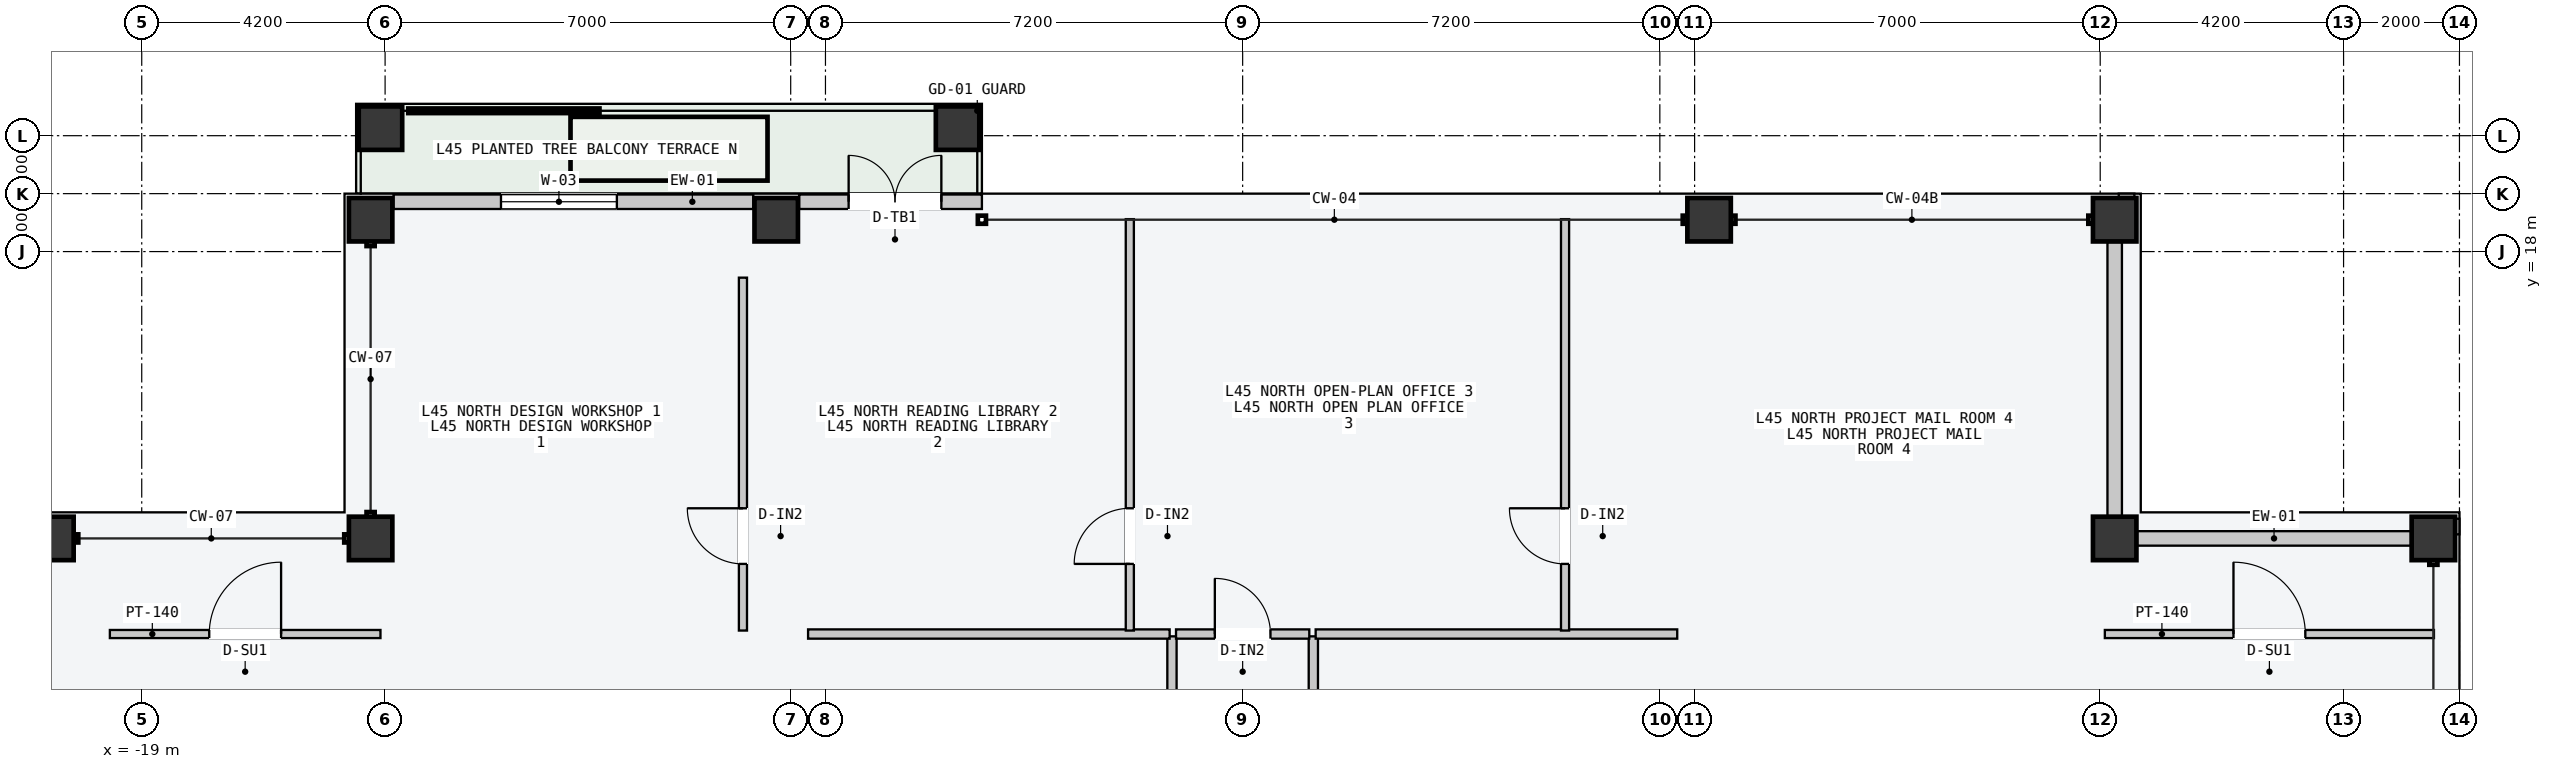
"""IFC4 building model, lengths in metres.
Left out: names, types, materials, properties, quantities, classifications, styles, units other than length and angle.
Written with IfcOpenShell. Run it as: python <this file> out.ifc"""

import sys

from ifc_helpers import new_model, si_unit, direction, frame, frame_2d, origin, origin_2d, place, context, subcontext, project, spatial, rectangle, hollow_rectangle, extrude, element, fill, save


model = new_model("IFC4")
c1 = context("Model", 3, precision=1e-05, world=origin(), true_north=direction((0.0, 1.0)))
c2 = subcontext(c1, "Body", "Model", "MODEL_VIEW")
j1 = project(units=[si_unit("LENGTHUNIT", "METRE"), si_unit("PLANEANGLEUNIT", "RADIAN")], contexts=[c1])
p1 = place(None, origin())
s1 = spatial("IfcSite", under=j1, at=p1, CompositionType="ELEMENT")
p2 = place(p1, origin())
s2 = spatial("IfcBuilding", under=s1, at=p2, CompositionType="ELEMENT")
p3 = place(p2, frame((0.0, 0.0, 173.1)))
s3 = spatial("IfcBuildingStorey", under=s2, at=p3, CompositionType="ELEMENT", Elevation=173.1)
for number, where, z_axis, x_axis in (
    (1, (-15.05, 18.55, 0.0), (0.0, 0.0, 1.0), (1.0, 0.0, 0.0)),
    (2, (-8.05, 18.55, 0.0), (0.0, 0.0, 1.0), (1.0, 0.0, 0.0)),
    (3, (8.05, 18.55, 0.0), (0.0, 0.0, 1.0), (1.0, 0.0, 0.0)),
    (4, (15.05, 18.55, 0.0), (0.0, 0.0, 1.0), (1.0, 0.0, 0.0)),
    (5, (-20.55, 13.05, 0.0), (0.0, 0.0, 1.0), (0.0, 1.0, 0.0)),
    (6, (20.55, 13.05, 0.0), (0.0, 0.0, 1.0), (0.0, 1.0, 0.0)),
    (7, (-15.05, 13.05, 0.0), (0.0, 0.0, 1.0), (1.0, 0.0, 0.0)),
    (8, (15.05, 13.05, 0.0), (0.0, 0.0, 1.0), (1.0, 0.0, 0.0)),
    (9, (-14.88, 20.13, 0.0), (0.0, 0.0, 1.0), (1.0, 0.0, 0.0)),
    (10, (-4.92, 20.13, 0.0), (0.0, 0.0, 1.0), (1.0, 0.0, 0.0)),
):
    element("IfcColumn", number, at=place(p3, frame(where, z_axis=z_axis, x_axis=x_axis)), inside=s3, PredefinedType="COLUMN", context=c2, shape_type="SweptSolid", body=[
        extrude(hollow_rectangle(XDim=0.75, YDim=0.75, WallThickness=0.032, at=origin_2d()), origin(), (0.0, 0.0, 1.0), 3.6),
    ])
p4 = place(p3, frame((-14.655, 18.86, 0.0), z_axis=(0.0, 0.0, 1.0), x_axis=(1.0, 0.0, 0.0)))
e11 = element("IfcWall", 11, at=p4, inside=s3, PredefinedType="STANDARD", context=c2, shape_type="SweptSolid", body=[
    extrude(rectangle(XDim=6.21, YDim=0.25, at=frame_2d((3.105, 0.0))), origin(), (0.0, 0.0, 1.0), 3.4),
])
p5 = place(p4, frame((1.855, 0.0, 0.85)))
e12 = element("IfcOpeningElement", 12, at=p5, cuts=e11, PredefinedType="OPENING", context=c2, shape_type="SweptSolid", body=[
    extrude(rectangle(XDim=2.0, YDim=2.1, at=frame_2d((1.0, 1.05))), frame((0.0, 0.135, 0.0), z_axis=(0.0, -1.0, 0.0), x_axis=(1.0, 0.0, 0.0)), (0.0, 0.0, 1.0), 0.27),
])
p6 = place(p3, frame((-7.655, 18.86, 0.0), z_axis=(0.0, 0.0, 1.0), x_axis=(1.0, 0.0, 0.0)))
e13 = element("IfcWall", 13, at=p6, inside=s3, PredefinedType="STANDARD", context=c2, shape_type="SweptSolid", body=[
    extrude(rectangle(XDim=3.155, YDim=0.25, at=frame_2d((1.578, 0.0))), origin(), (0.0, 0.0, 1.0), 3.4),
])
p7 = place(p6, frame((0.855, 0.0, 0.0)))
e14 = element("IfcOpeningElement", 14, at=p7, cuts=e13, PredefinedType="OPENING", context=c2, shape_type="SweptSolid", body=[
    extrude(rectangle(XDim=1.6, YDim=2.2, at=frame_2d((0.8, 1.1))), frame((0.0, 0.135, 0.0), z_axis=(0.0, -1.0, 0.0), x_axis=(1.0, 0.0, 0.0)), (0.0, 0.0, 1.0), 0.27),
])
for number, where, z_axis, x_axis in (
    (15, (15.435, 13.05, 0.0), (0.0, 0.0, 1.0), (1.0, 0.0, 0.0)),
    (16, (15.05, 13.435, 0.0), (0.0, 0.0, 1.0), (0.0, 1.0, 0.0)),
):
    element("IfcWall", number, at=place(p3, frame(where, z_axis=z_axis, x_axis=x_axis)), inside=s3, PredefinedType="STANDARD", context=c2, shape_type="SweptSolid", body=[
        extrude(rectangle(XDim=4.73, YDim=0.25, at=frame_2d((2.365, 0.0))), origin(), (0.0, 0.0, 1.0), 2.75),
    ])
for number, where, z_axis, x_axis in (
    (17, (15.12, 18.89, 0.0), (0.0, 0.0, 1.0), (1.0, 0.0, 0.0)),
    (18, (20.89, 13.12, 0.0), (0.0, 0.0, 1.0), (0.0, 1.0, 0.0)),
):
    element("IfcWall", number, at=place(p3, frame(where, z_axis=z_axis, x_axis=x_axis)), inside=s3, PredefinedType="PARAPET", context=c2, shape_type="SweptSolid", body=[
        extrude(rectangle(XDim=0.27, YDim=0.22, at=frame_2d((0.135, 0.0))), origin(), (0.0, 0.0, 1.0), 1.2),
    ])
p8 = place(p3, frame((-1.22, -3.5, 0.0), z_axis=(0.0, 0.0, 1.0), x_axis=(0.0, 1.0, 0.0)))
e19 = element("IfcWall", 19, at=p8, inside=s3, PredefinedType="PARTITIONING", context=c2, shape_type="SweptSolid", body=[
    extrude(rectangle(XDim=14.86, YDim=0.16, at=frame_2d((7.43, 0.0))), origin(), (0.0, 0.0, 1.0), 3.4),
])
p9 = place(p8, frame((6.1, 0.0, 0.0)))
e20 = element("IfcOpeningElement", 20, at=p9, cuts=e19, PredefinedType="OPENING", context=c2, shape_type="SweptSolid", body=[
    extrude(rectangle(XDim=1.24, YDim=2.24, at=frame_2d((0.62, 1.12))), frame((0.0, 0.09, 0.0), z_axis=(0.0, -1.0, 0.0), x_axis=(1.0, 0.0, 0.0)), (0.0, 0.0, 1.0), 0.18),
])
p10 = place(p8, frame((1.6, 0.0, 0.0)))
e21 = element("IfcOpeningElement", 21, at=p10, cuts=e19, PredefinedType="OPENING", context=c2, shape_type="SweptSolid", body=[
    extrude(rectangle(XDim=0.96, YDim=2.18, at=frame_2d((0.48, 1.09))), frame((0.0, 0.09, 0.0), z_axis=(0.0, -1.0, 0.0), x_axis=(1.0, 0.0, 0.0)), (0.0, 0.0, 1.0), 0.18),
])
p11 = place(p3, frame((-7.5, 11.4, 0.0), z_axis=(0.0, 0.0, 1.0), x_axis=(1.0, 0.0, 0.0)))
e22 = element("IfcWall", 22, at=p11, inside=s3, PredefinedType="PARTITIONING", context=c2, shape_type="SweptSolid", body=[
    extrude(rectangle(XDim=6.24, YDim=0.16, at=frame_2d((3.12, 0.0))), origin(), (0.0, 0.0, 1.0), 3.4),
])
p12 = place(p3, frame((1.22, -3.5, 0.0), z_axis=(0.0, 0.0, 1.0), x_axis=(0.0, 1.0, 0.0)))
e23 = element("IfcWall", 23, at=p12, inside=s3, PredefinedType="PARTITIONING", context=c2, shape_type="SweptSolid", body=[
    extrude(rectangle(XDim=14.86, YDim=0.16, at=frame_2d((7.43, 0.0))), origin(), (0.0, 0.0, 1.0), 3.4),
])
p13 = place(p12, frame((6.1, 0.0, 0.0)))
e24 = element("IfcOpeningElement", 24, at=p13, cuts=e23, PredefinedType="OPENING", context=c2, shape_type="SweptSolid", body=[
    extrude(rectangle(XDim=1.24, YDim=2.24, at=frame_2d((0.62, 1.12))), frame((0.0, 0.09, 0.0), z_axis=(0.0, -1.0, 0.0), x_axis=(1.0, 0.0, 0.0)), (0.0, 0.0, 1.0), 0.18),
])
p14 = place(p12, frame((1.6, 0.0, 0.0)))
e25 = element("IfcOpeningElement", 25, at=p14, cuts=e23, PredefinedType="OPENING", context=c2, shape_type="SweptSolid", body=[
    extrude(rectangle(XDim=0.96, YDim=2.18, at=frame_2d((0.48, 1.09))), frame((0.0, 0.09, 0.0), z_axis=(0.0, -1.0, 0.0), x_axis=(1.0, 0.0, 0.0)), (0.0, 0.0, 1.0), 0.18),
])
p15 = place(p3, frame((1.26, 11.4, 0.0), z_axis=(0.0, 0.0, 1.0), x_axis=(1.0, 0.0, 0.0)))
e26 = element("IfcWall", 26, at=p15, inside=s3, PredefinedType="PARTITIONING", context=c2, shape_type="SweptSolid", body=[
    extrude(rectangle(XDim=6.24, YDim=0.16, at=frame_2d((3.12, 0.0))), origin(), (0.0, 0.0, 1.0), 3.4),
])
p16 = place(p3, frame((-8.624, 11.46, 0.0), z_axis=(0.0, 0.0, 1.0), x_axis=(0.0, 1.0, 0.0)))
e27 = element("IfcWall", 27, at=p16, inside=s3, PredefinedType="PARTITIONING", context=c2, shape_type="SweptSolid", body=[
    extrude(rectangle(XDim=6.09, YDim=0.14, at=frame_2d((3.045, 0.0))), origin(), (0.0, 0.0, 1.0), 3.4),
])
p17 = place(p16, frame((1.15, 0.0, 0.0)))
e28 = element("IfcOpeningElement", 28, at=p17, cuts=e27, PredefinedType="OPENING", context=c2, shape_type="SweptSolid", body=[
    extrude(rectangle(XDim=0.96, YDim=2.18, at=frame_2d((0.48, 1.09))), frame((0.0, 0.08, 0.0), z_axis=(0.0, -1.0, 0.0), x_axis=(1.0, 0.0, 0.0)), (0.0, 0.0, 1.0), 0.16),
])
p18 = place(p3, frame((-1.948, 11.46, 0.0), z_axis=(0.0, 0.0, 1.0), x_axis=(0.0, 1.0, 0.0)))
e29 = element("IfcWall", 29, at=p18, inside=s3, PredefinedType="PARTITIONING", context=c2, shape_type="SweptSolid", body=[
    extrude(rectangle(XDim=7.1, YDim=0.14, at=frame_2d((3.55, 0.0))), origin(), (0.0, 0.0, 1.0), 3.4),
])
p19 = place(p18, frame((1.15, 0.0, 0.0)))
e30 = element("IfcOpeningElement", 30, at=p19, cuts=e29, PredefinedType="OPENING", context=c2, shape_type="SweptSolid", body=[
    extrude(rectangle(XDim=0.96, YDim=2.18, at=frame_2d((0.48, 1.09))), frame((0.0, 0.08, 0.0), z_axis=(0.0, -1.0, 0.0), x_axis=(1.0, 0.0, 0.0)), (0.0, 0.0, 1.0), 0.16),
])
p20 = place(p3, frame((5.564, 11.46, 0.0), z_axis=(0.0, 0.0, 1.0), x_axis=(0.0, 1.0, 0.0)))
e31 = element("IfcWall", 31, at=p20, inside=s3, PredefinedType="PARTITIONING", context=c2, shape_type="SweptSolid", body=[
    extrude(rectangle(XDim=7.1, YDim=0.14, at=frame_2d((3.55, 0.0))), origin(), (0.0, 0.0, 1.0), 3.4),
])
p21 = place(p20, frame((1.15, 0.0, 0.0)))
e32 = element("IfcOpeningElement", 32, at=p21, cuts=e31, PredefinedType="OPENING", context=c2, shape_type="SweptSolid", body=[
    extrude(rectangle(XDim=0.96, YDim=2.18, at=frame_2d((0.48, 1.09))), frame((0.0, 0.08, 0.0), z_axis=(0.0, -1.0, 0.0), x_axis=(1.0, 0.0, 0.0)), (0.0, 0.0, 1.0), 0.16),
])
p22 = place(p3, frame((-1.15, 11.4, 0.0), z_axis=(0.0, 0.0, 1.0), x_axis=(1.0, 0.0, 0.0)))
e33 = element("IfcWall", 33, at=p22, inside=s3, PredefinedType="PARTITIONING", context=c2, shape_type="SweptSolid", body=[
    extrude(rectangle(XDim=2.3, YDim=0.16, at=frame_2d((1.15, 0.0))), origin(), (0.0, 0.0, 1.0), 3.4),
])
p23 = place(p22, frame((0.67, 0.0, 0.0)))
e34 = element("IfcOpeningElement", 34, at=p23, cuts=e33, PredefinedType="OPENING", context=c2, shape_type="SweptSolid", body=[
    extrude(rectangle(XDim=0.96, YDim=2.18, at=frame_2d((0.48, 1.09))), frame((0.0, 0.09, 0.0), z_axis=(0.0, -1.0, 0.0), x_axis=(1.0, 0.0, 0.0)), (0.0, 0.0, 1.0), 0.18),
])
p24 = place(p3, frame((-19.55, 11.4, 0.0), z_axis=(0.0, 0.0, 1.0), x_axis=(1.0, 0.0, 0.0)))
e35 = element("IfcWall", 35, at=p24, inside=s3, PredefinedType="PARTITIONING", context=c2, shape_type="SweptSolid", body=[
    extrude(rectangle(XDim=4.67, YDim=0.14, at=frame_2d((2.335, 0.0))), origin(), (0.0, 0.0, 1.0), 3.4),
])
p25 = place(p24, frame((1.715, 0.0, 0.0)))
e36 = element("IfcOpeningElement", 36, at=p25, cuts=e35, PredefinedType="OPENING", context=c2, shape_type="SweptSolid", body=[
    extrude(rectangle(XDim=1.24, YDim=2.24, at=frame_2d((0.62, 1.12))), frame((0.0, 0.08, 0.0), z_axis=(0.0, -1.0, 0.0), x_axis=(1.0, 0.0, 0.0)), (0.0, 0.0, 1.0), 0.16),
])
p26 = place(p3, frame((14.88, 11.4, 0.0), z_axis=(0.0, 0.0, 1.0), x_axis=(1.0, 0.0, 0.0)))
e37 = element("IfcWall", 37, at=p26, inside=s3, PredefinedType="PARTITIONING", context=c2, shape_type="SweptSolid", body=[
    extrude(rectangle(XDim=5.68, YDim=0.14, at=frame_2d((2.84, 0.0))), origin(), (0.0, 0.0, 1.0), 3.4),
])
p27 = place(p26, frame((2.22, 0.0, 0.0)))
e38 = element("IfcOpeningElement", 38, at=p27, cuts=e37, PredefinedType="OPENING", context=c2, shape_type="SweptSolid", body=[
    extrude(rectangle(XDim=1.24, YDim=2.24, at=frame_2d((0.62, 1.12))), frame((0.0, 0.08, 0.0), z_axis=(0.0, -1.0, 0.0), x_axis=(1.0, 0.0, 0.0)), (0.0, 0.0, 1.0), 0.16),
])
p28 = place(p5, origin())
e39 = element("IfcWindow", 39, at=p28, inside=s3, PartitioningType="SINGLE_PANEL", PredefinedType="WINDOW", context=c2, shape_type="SweptSolid", body=[
    extrude(rectangle(XDim=2.0, YDim=2.1, at=frame_2d((1.0, 1.05))), frame((0.0, 0.03, 0.0), z_axis=(0.0, -1.0, 0.0), x_axis=(1.0, 0.0, 0.0)), (0.0, 0.0, 1.0), 0.06),
])
fill(e12, e39)
p29 = place(p7, origin())
e40 = element("IfcDoor", 40, at=p29, inside=s3, OperationType="DOUBLE_DOOR_SINGLE_SWING", PredefinedType="DOOR", context=c2, shape_type="SweptSolid", body=[
    extrude(rectangle(XDim=1.6, YDim=2.2, at=frame_2d((0.8, 1.1))), frame((0.0, 0.025, 0.0), z_axis=(0.0, -1.0, 0.0), x_axis=(1.0, 0.0, 0.0)), (0.0, 0.0, 1.0), 0.05),
])
fill(e14, e40)
p30 = place(p17, origin())
e41 = element("IfcDoor", 41, at=p30, inside=s3, OperationType="SINGLE_SWING_RIGHT", PredefinedType="DOOR", context=c2, shape_type="SweptSolid", body=[
    extrude(rectangle(XDim=0.96, YDim=2.18, at=frame_2d((0.48, 1.09))), frame((0.0, 0.025, 0.0), z_axis=(0.0, -1.0, 0.0), x_axis=(1.0, 0.0, 0.0)), (0.0, 0.0, 1.0), 0.05),
])
fill(e28, e41)
p31 = place(p19, origin())
e42 = element("IfcDoor", 42, at=p31, inside=s3, OperationType="SINGLE_SWING_LEFT", PredefinedType="DOOR", context=c2, shape_type="SweptSolid", body=[
    extrude(rectangle(XDim=0.96, YDim=2.18, at=frame_2d((0.48, 1.09))), frame((0.0, 0.025, 0.0), z_axis=(0.0, -1.0, 0.0), x_axis=(1.0, 0.0, 0.0)), (0.0, 0.0, 1.0), 0.05),
])
fill(e30, e42)
p32 = place(p21, origin())
e43 = element("IfcDoor", 43, at=p32, inside=s3, OperationType="SINGLE_SWING_RIGHT", PredefinedType="DOOR", context=c2, shape_type="SweptSolid", body=[
    extrude(rectangle(XDim=0.96, YDim=2.18, at=frame_2d((0.48, 1.09))), frame((0.0, 0.025, 0.0), z_axis=(0.0, -1.0, 0.0), x_axis=(1.0, 0.0, 0.0)), (0.0, 0.0, 1.0), 0.05),
])
fill(e32, e43)
p33 = place(p23, origin())
e44 = element("IfcDoor", 44, at=p33, inside=s3, OperationType="SINGLE_SWING_LEFT", PredefinedType="DOOR", context=c2, shape_type="SweptSolid", body=[
    extrude(rectangle(XDim=0.96, YDim=2.18, at=frame_2d((0.48, 1.09))), frame((0.0, 0.025, 0.0), z_axis=(0.0, -1.0, 0.0), x_axis=(1.0, 0.0, 0.0)), (0.0, 0.0, 1.0), 0.05),
])
fill(e34, e44)
p34 = place(p25, origin())
e45 = element("IfcDoor", 45, at=p34, inside=s3, OperationType="SINGLE_SWING_RIGHT", PredefinedType="DOOR", context=c2, shape_type="SweptSolid", body=[
    extrude(rectangle(XDim=1.24, YDim=2.24, at=frame_2d((0.62, 1.12))), frame((0.0, 0.025, 0.0), z_axis=(0.0, -1.0, 0.0), x_axis=(1.0, 0.0, 0.0)), (0.0, 0.0, 1.0), 0.05),
])
fill(e36, e45)
p35 = place(p27, origin())
e46 = element("IfcDoor", 46, at=p35, inside=s3, OperationType="SINGLE_SWING_LEFT", PredefinedType="DOOR", context=c2, shape_type="SweptSolid", body=[
    extrude(rectangle(XDim=1.24, YDim=2.24, at=frame_2d((0.62, 1.12))), frame((0.0, 0.025, 0.0), z_axis=(0.0, -1.0, 0.0), x_axis=(1.0, 0.0, 0.0)), (0.0, 0.0, 1.0), 0.05),
])
fill(e38, e46)
save(model, sys.argv[1])
